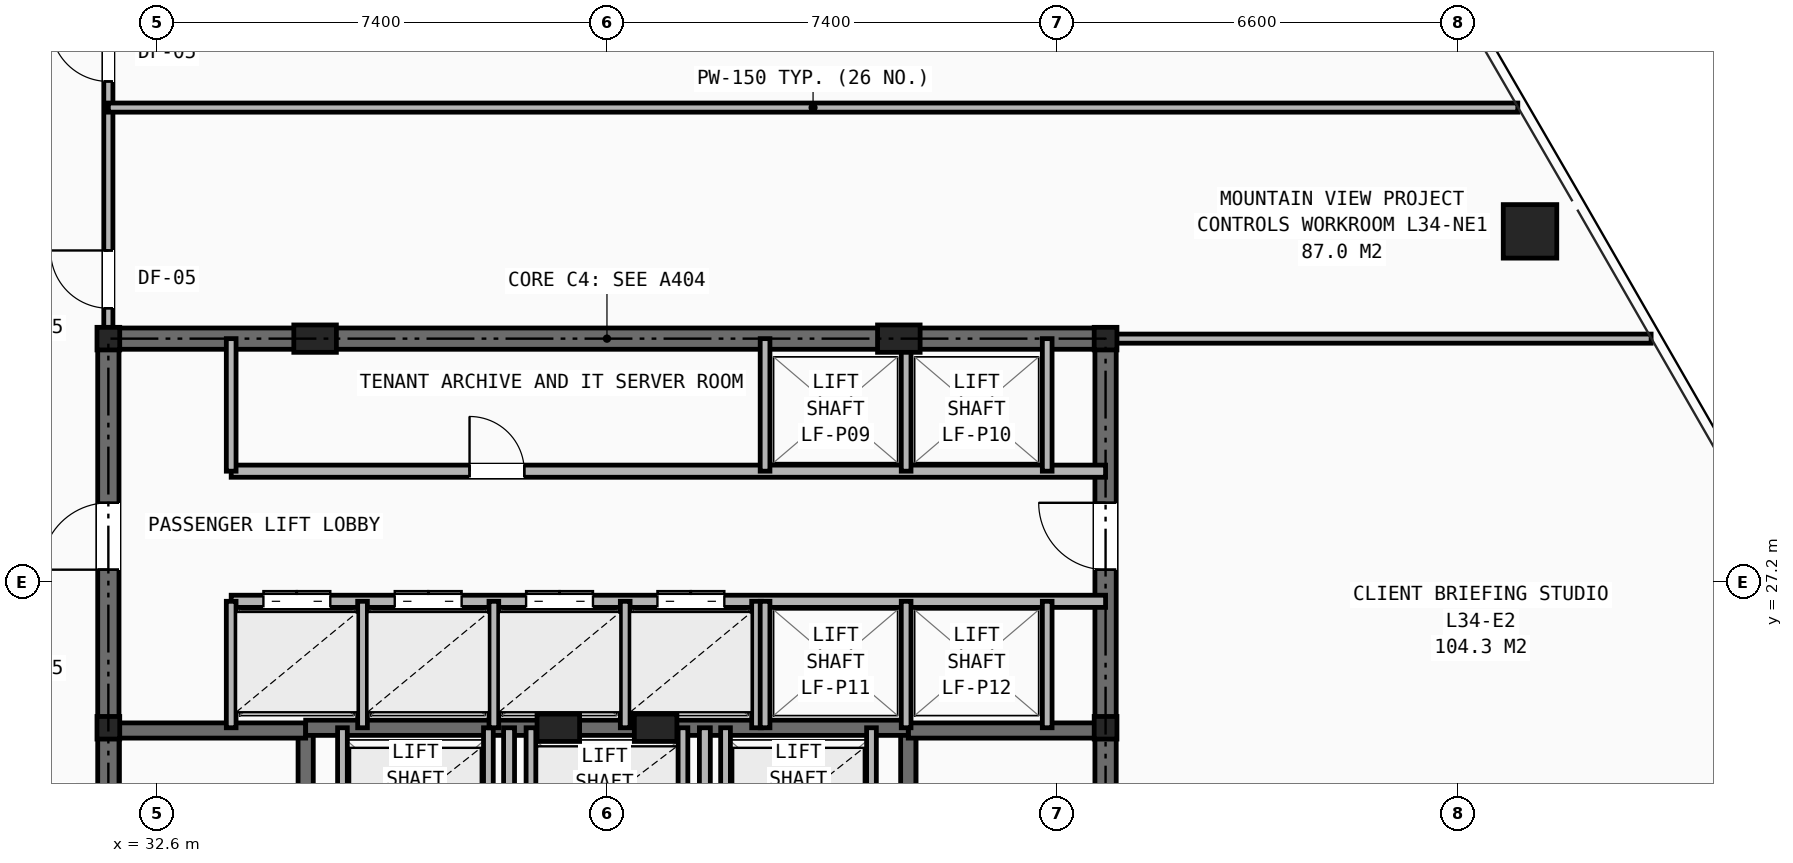
"""IFC4 building model, lengths in metres.
Left out: names, types, materials, properties, quantities, classifications, styles, units other than length and angle.
Written with IfcOpenShell. Run it as: python <this file> out.ifc"""

import sys

from ifc_helpers import new_model, si_unit, direction, frame, frame_2d, origin, origin_2d, place, context, subcontext, project, spatial, rectangle, hollow_rectangle, i_section, extrude, element, fill, save


model = new_model("IFC4")
c1 = context("Model", 3, precision=1e-05, world=origin(), true_north=direction((0.0, 1.0)))
c2 = subcontext(c1, "Body", "Model", "MODEL_VIEW")
j1 = project(units=[si_unit("LENGTHUNIT", "METRE"), si_unit("PLANEANGLEUNIT", "RADIAN")], contexts=[c1])
p1 = place(None, origin())
s1 = spatial("IfcSite", under=j1, at=p1, CompositionType="ELEMENT")
p2 = place(p1, origin())
s2 = spatial("IfcBuilding", under=s1, at=p2, CompositionType="ELEMENT")
p3 = place(p2, frame((0.0, 0.0, 119.45)))
s3 = spatial("IfcBuildingStorey", under=s2, at=p3, CompositionType="ELEMENT", Elevation=119.45)
for number, where, z_axis, x_axis in (
    (1, (31.8, 24.8, 0.0), (0.0, 0.0, 1.0), (1.0, 0.0, 0.0)),
    (2, (48.2, 24.8, 0.0), (0.0, 0.0, 1.0), (1.0, 0.0, 0.0)),
    (3, (31.8, 31.2, 0.0), (0.0, 0.0, 1.0), (1.0, 0.0, 0.0)),
    (4, (48.2, 31.2, 0.0), (0.0, 0.0, 1.0), (1.0, 0.0, 0.0)),
):
    element("IfcColumn", number, at=place(p3, frame(where, z_axis=z_axis, x_axis=x_axis)), inside=s3, PredefinedType="COLUMN", context=c2, shape_type="SweptSolid", body=[
        extrude(i_section(OverallWidth=0.374, OverallDepth=0.372, WebThickness=0.016, FlangeThickness=0.026, at=origin_2d()), origin(), (0.0, 0.0, 1.0), 3.45),
    ])
for number, where, z_axis, x_axis in (
    (5, (35.2, 31.2, 0.0), (0.0, 0.0, 1.0), (1.0, 0.0, 0.0)),
    (6, (44.8, 31.2, 0.0), (0.0, 0.0, 1.0), (1.0, 0.0, 0.0)),
    (7, (39.2, 24.8, 0.0), (0.0, 0.0, 1.0), (1.0, 0.0, 0.0)),
    (8, (40.8, 24.8, 0.0), (0.0, 0.0, 1.0), (1.0, 0.0, 0.0)),
):
    element("IfcColumn", number, at=place(p3, frame(where, z_axis=z_axis, x_axis=x_axis)), inside=s3, PredefinedType="PILASTER", context=c2, shape_type="SweptSolid", body=[
        extrude(rectangle(XDim=0.7, YDim=0.45, at=origin_2d()), origin(), (0.0, 0.0, 1.0), 3.45),
    ])
p4 = place(p3, frame((55.18, 32.964, 0.0), z_axis=(0.0, 0.0, 1.0), x_axis=(1.0, 0.0, 0.0)))
e9 = element("IfcColumn", 9, at=p4, inside=s3, PredefinedType="COLUMN", context=c2, shape_type="SweptSolid", body=[
    extrude(hollow_rectangle(XDim=0.88, YDim=0.88, WallThickness=0.06, at=origin_2d()), origin(), (0.0, 0.0, 1.0), 3.45),
])
p5 = place(p3, frame((31.8, 31.2, 0.0), z_axis=(0.0, 0.0, 1.0), x_axis=(1.0, 0.0, 0.0)))
e10 = element("IfcWall", 10, at=p5, inside=s3, PredefinedType="SHEAR", context=c2, shape_type="SweptSolid", body=[
    extrude(rectangle(XDim=16.4, YDim=0.35, at=frame_2d((8.2, 0.0))), origin(), (0.0, 0.0, 1.0), 3.21),
])
p6 = place(p3, frame((31.8, 16.4, 0.0), z_axis=(0.0, 0.0, 1.0), x_axis=(0.0, 1.0, 0.0)))
e11 = element("IfcWall", 11, at=p6, inside=s3, PredefinedType="SHEAR", context=c2, shape_type="SweptSolid", body=[
    extrude(rectangle(XDim=14.8, YDim=0.35, at=frame_2d((7.4, 0.0))), origin(), (0.0, 0.0, 1.0), 3.21),
])
p7 = place(p6, frame((11.0, 0.0, 0.0)))
e12 = element("IfcOpeningElement", 12, at=p7, cuts=e11, PredefinedType="OPENING", context=c2, shape_type="SweptSolid", body=[
    extrude(rectangle(XDim=1.1, YDim=2.15, at=frame_2d((0.55, 1.075))), frame((0.0, 0.185, 0.0), z_axis=(0.0, -1.0, 0.0), x_axis=(1.0, 0.0, 0.0)), (0.0, 0.0, 1.0), 0.37),
])
p8 = place(p3, frame((48.2, 16.4, 0.0), z_axis=(0.0, 0.0, 1.0), x_axis=(0.0, 1.0, 0.0)))
e13 = element("IfcWall", 13, at=p8, inside=s3, PredefinedType="SHEAR", context=c2, shape_type="SweptSolid", body=[
    extrude(rectangle(XDim=14.8, YDim=0.35, at=frame_2d((7.4, 0.0))), origin(), (0.0, 0.0, 1.0), 3.21),
])
p9 = place(p8, frame((11.0, 0.0, 0.0)))
e14 = element("IfcOpeningElement", 14, at=p9, cuts=e13, PredefinedType="OPENING", context=c2, shape_type="SweptSolid", body=[
    extrude(rectangle(XDim=1.1, YDim=2.15, at=frame_2d((0.55, 1.075))), frame((0.0, 0.185, 0.0), z_axis=(0.0, -1.0, 0.0), x_axis=(1.0, 0.0, 0.0)), (0.0, 0.0, 1.0), 0.37),
])
p10 = place(p3, frame((35.045, 16.4, 0.0), z_axis=(0.0, 0.0, 1.0), x_axis=(0.0, 1.0, 0.0)))
e15 = element("IfcWall", 15, at=p10, inside=s3, PredefinedType="SHEAR", context=c2, shape_type="SweptSolid", body=[
    extrude(rectangle(XDim=8.4, YDim=0.25, at=frame_2d((4.2, 0.0))), origin(), (0.0, 0.0, 1.0), 3.21),
])
p11 = place(p10, frame((0.45, 0.0, 0.0)))
e16 = element("IfcOpeningElement", 16, at=p11, cuts=e15, PredefinedType="OPENING", context=c2, shape_type="SweptSolid", body=[
    extrude(rectangle(XDim=0.95, YDim=2.1, at=frame_2d((0.475, 1.05))), frame((0.0, 0.135, 0.0), z_axis=(0.0, -1.0, 0.0), x_axis=(1.0, 0.0, 0.0)), (0.0, 0.0, 1.0), 0.27),
])
p12 = place(p3, frame((31.8, 24.755, 0.0), z_axis=(0.0, 0.0, 1.0), x_axis=(1.0, 0.0, 0.0)))
e17 = element("IfcWall", 17, at=p12, inside=s3, PredefinedType="SHEAR", context=c2, shape_type="SweptSolid", body=[
    extrude(rectangle(XDim=3.245, YDim=0.25, at=frame_2d((1.623, 0.0))), origin(), (0.0, 0.0, 1.0), 3.21),
])
p13 = place(p3, frame((44.955, 16.4, 0.0), z_axis=(0.0, 0.0, 1.0), x_axis=(0.0, 1.0, 0.0)))
e18 = element("IfcWall", 18, at=p13, inside=s3, PredefinedType="SHEAR", context=c2, shape_type="SweptSolid", body=[
    extrude(rectangle(XDim=8.4, YDim=0.25, at=frame_2d((4.2, 0.0))), origin(), (0.0, 0.0, 1.0), 3.21),
])
p14 = place(p13, frame((0.45, 0.0, 0.0)))
e19 = element("IfcOpeningElement", 19, at=p14, cuts=e18, PredefinedType="OPENING", context=c2, shape_type="SweptSolid", body=[
    extrude(rectangle(XDim=0.95, YDim=2.1, at=frame_2d((0.475, 1.05))), frame((0.0, 0.135, 0.0), z_axis=(0.0, -1.0, 0.0), x_axis=(1.0, 0.0, 0.0)), (0.0, 0.0, 1.0), 0.27),
])
p15 = place(p3, frame((44.955, 24.755, 0.0), z_axis=(0.0, 0.0, 1.0), x_axis=(1.0, 0.0, 0.0)))
e20 = element("IfcWall", 20, at=p15, inside=s3, PredefinedType="SHEAR", context=c2, shape_type="SweptSolid", body=[
    extrude(rectangle(XDim=3.245, YDim=0.25, at=frame_2d((1.623, 0.0))), origin(), (0.0, 0.0, 1.0), 3.21),
])
p16 = place(p3, frame((35.045, 24.8, 0.0), z_axis=(0.0, 0.0, 1.0), x_axis=(1.0, 0.0, 0.0)))
e21 = element("IfcWall", 21, at=p16, inside=s3, PredefinedType="SHEAR", context=c2, shape_type="SweptSolid", body=[
    extrude(rectangle(XDim=9.91, YDim=0.25, at=frame_2d((4.955, 0.0))), origin(), (0.0, 0.0, 1.0), 3.21),
])
p17 = place(p3, frame((38.39, 16.4, 0.0), z_axis=(0.0, 0.0, 1.0), x_axis=(0.0, 1.0, 0.0)))
e22 = element("IfcWall", 22, at=p17, inside=s3, PredefinedType="PARTITIONING", context=c2, shape_type="SweptSolid", body=[
    extrude(rectangle(XDim=8.4, YDim=0.18, at=frame_2d((4.2, 0.0))), origin(), (0.0, 0.0, 1.0), 2.661),
])
p18 = place(p17, frame((1.8, 0.0, 0.0)))
e23 = element("IfcOpeningElement", 23, at=p18, cuts=e22, PredefinedType="OPENING", context=c2, shape_type="SweptSolid", body=[
    extrude(rectangle(XDim=0.85, YDim=2.05, at=frame_2d((0.425, 1.025))), frame((0.0, 0.1, 0.0), z_axis=(0.0, -1.0, 0.0), x_axis=(1.0, 0.0, 0.0)), (0.0, 0.0, 1.0), 0.2),
])
p19 = place(p17, frame((4.35, 0.0, 0.0)))
e24 = element("IfcOpeningElement", 24, at=p19, cuts=e22, PredefinedType="OPENING", context=c2, shape_type="SweptSolid", body=[
    extrude(rectangle(XDim=0.95, YDim=2.1, at=frame_2d((0.475, 1.05))), frame((0.0, 0.1, 0.0), z_axis=(0.0, -1.0, 0.0), x_axis=(1.0, 0.0, 0.0)), (0.0, 0.0, 1.0), 0.2),
])
p20 = place(p3, frame((41.61, 16.4, 0.0), z_axis=(0.0, 0.0, 1.0), x_axis=(0.0, 1.0, 0.0)))
e25 = element("IfcWall", 25, at=p20, inside=s3, PredefinedType="PARTITIONING", context=c2, shape_type="SweptSolid", body=[
    extrude(rectangle(XDim=8.4, YDim=0.18, at=frame_2d((4.2, 0.0))), origin(), (0.0, 0.0, 1.0), 2.661),
])
p21 = place(p20, frame((1.8, 0.0, 0.0)))
e26 = element("IfcOpeningElement", 26, at=p21, cuts=e25, PredefinedType="OPENING", context=c2, shape_type="SweptSolid", body=[
    extrude(rectangle(XDim=0.85, YDim=2.05, at=frame_2d((0.425, 1.025))), frame((0.0, 0.1, 0.0), z_axis=(0.0, -1.0, 0.0), x_axis=(1.0, 0.0, 0.0)), (0.0, 0.0, 1.0), 0.2),
])
for number, where, z_axis, x_axis in (
    (27, (35.65, 22.48, 0.0), (0.0, 0.0, 1.0), (0.0, 1.0, 0.0)),
    (28, (38.05, 22.48, 0.0), (0.0, 0.0, 1.0), (0.0, 1.0, 0.0)),
    (29, (41.95, 22.48, 0.0), (0.0, 0.0, 1.0), (0.0, 1.0, 0.0)),
    (30, (44.35, 22.48, 0.0), (0.0, 0.0, 1.0), (0.0, 1.0, 0.0)),
    (31, (38.75, 22.48, 0.0), (0.0, 0.0, 1.0), (0.0, 1.0, 0.0)),
    (32, (41.25, 22.48, 0.0), (0.0, 0.0, 1.0), (0.0, 1.0, 0.0)),
):
    element("IfcWall", number, at=place(p3, frame(where, z_axis=z_axis, x_axis=x_axis)), inside=s3, PredefinedType="SOLIDWALL", context=c2, shape_type="SweptSolid", body=[
        extrude(rectangle(XDim=2.32, YDim=0.16, at=frame_2d((1.16, 0.0))), origin(), (0.0, 0.0, 1.0), 3.21),
    ])
p22 = place(p3, frame((33.82, 29.02, 0.0), z_axis=(0.0, 0.0, 1.0), x_axis=(1.0, 0.0, 0.0)))
e33 = element("IfcWall", 33, at=p22, inside=s3, PredefinedType="SOLIDWALL", context=c2, shape_type="SweptSolid", body=[
    extrude(rectangle(XDim=14.38, YDim=0.2, at=frame_2d((7.19, 0.0))), origin(), (0.0, 0.0, 1.0), 2.661),
])
p23 = place(p22, frame((3.92, 0.0, 0.0)))
e34 = element("IfcOpeningElement", 34, at=p23, cuts=e33, PredefinedType="OPENING", context=c2, shape_type="SweptSolid", body=[
    extrude(rectangle(XDim=0.9, YDim=2.1, at=frame_2d((0.45, 1.05))), frame((0.0, 0.11, 0.0), z_axis=(0.0, -1.0, 0.0), x_axis=(1.0, 0.0, 0.0)), (0.0, 0.0, 1.0), 0.22),
])
p24 = place(p3, frame((33.82, 26.88, 0.0), z_axis=(0.0, 0.0, 1.0), x_axis=(1.0, 0.0, 0.0)))
e35 = element("IfcWall", 35, at=p24, inside=s3, PredefinedType="SOLIDWALL", context=c2, shape_type="SweptSolid", body=[
    extrude(rectangle(XDim=14.38, YDim=0.2, at=frame_2d((7.19, 0.0))), origin(), (0.0, 0.0, 1.0), 2.661),
])
p25 = place(p24, frame((0.53, 0.0, 0.0)))
e36 = element("IfcOpeningElement", 36, at=p25, cuts=e35, PredefinedType="OPENING", context=c2, shape_type="SweptSolid", body=[
    extrude(rectangle(XDim=1.1, YDim=2.15, at=frame_2d((0.55, 1.075))), frame((0.0, 0.11, 0.0), z_axis=(0.0, -1.0, 0.0), x_axis=(1.0, 0.0, 0.0)), (0.0, 0.0, 1.0), 0.22),
])
p26 = place(p24, frame((2.69, 0.0, 0.0)))
e37 = element("IfcOpeningElement", 37, at=p26, cuts=e35, PredefinedType="OPENING", context=c2, shape_type="SweptSolid", body=[
    extrude(rectangle(XDim=1.1, YDim=2.15, at=frame_2d((0.55, 1.075))), frame((0.0, 0.11, 0.0), z_axis=(0.0, -1.0, 0.0), x_axis=(1.0, 0.0, 0.0)), (0.0, 0.0, 1.0), 0.22),
])
p27 = place(p24, frame((4.85, 0.0, 0.0)))
e38 = element("IfcOpeningElement", 38, at=p27, cuts=e35, PredefinedType="OPENING", context=c2, shape_type="SweptSolid", body=[
    extrude(rectangle(XDim=1.1, YDim=2.15, at=frame_2d((0.55, 1.075))), frame((0.0, 0.11, 0.0), z_axis=(0.0, -1.0, 0.0), x_axis=(1.0, 0.0, 0.0)), (0.0, 0.0, 1.0), 0.22),
])
p28 = place(p24, frame((7.01, 0.0, 0.0)))
e39 = element("IfcOpeningElement", 39, at=p28, cuts=e35, PredefinedType="OPENING", context=c2, shape_type="SweptSolid", body=[
    extrude(rectangle(XDim=1.1, YDim=2.15, at=frame_2d((0.55, 1.075))), frame((0.0, 0.11, 0.0), z_axis=(0.0, -1.0, 0.0), x_axis=(1.0, 0.0, 0.0)), (0.0, 0.0, 1.0), 0.22),
])
p29 = place(p3, frame((33.82, 29.02, 0.0), z_axis=(0.0, 0.0, 1.0), x_axis=(0.0, 1.0, 0.0)))
e40 = element("IfcWall", 40, at=p29, inside=s3, PredefinedType="SOLIDWALL", context=c2, shape_type="SweptSolid", body=[
    extrude(rectangle(XDim=2.18, YDim=0.16, at=frame_2d((1.09, 0.0))), origin(), (0.0, 0.0, 1.0), 2.661),
])
for number, where, z_axis, x_axis in (
    (41, (33.82, 24.8, 0.0), (0.0, 0.0, 1.0), (0.0, 1.0, 0.0)),
    (42, (35.98, 24.8, 0.0), (0.0, 0.0, 1.0), (0.0, 1.0, 0.0)),
    (43, (38.14, 24.8, 0.0), (0.0, 0.0, 1.0), (0.0, 1.0, 0.0)),
    (44, (40.3, 24.8, 0.0), (0.0, 0.0, 1.0), (0.0, 1.0, 0.0)),
    (45, (42.46, 24.8, 0.0), (0.0, 0.0, 1.0), (0.0, 1.0, 0.0)),
):
    element("IfcWall", number, at=place(p3, frame(where, z_axis=z_axis, x_axis=x_axis)), inside=s3, PredefinedType="SOLIDWALL", context=c2, shape_type="SweptSolid", body=[
        extrude(rectangle(XDim=2.08, YDim=0.16, at=frame_2d((1.04, 0.0))), origin(), (0.0, 0.0, 1.0), 3.21),
    ])
for number, where, z_axis, x_axis in (
    (46, (42.6, 29.02, 0.0), (0.0, 0.0, 1.0), (0.0, 1.0, 0.0)),
    (47, (44.92, 29.02, 0.0), (0.0, 0.0, 1.0), (0.0, 1.0, 0.0)),
    (48, (47.24, 29.02, 0.0), (0.0, 0.0, 1.0), (0.0, 1.0, 0.0)),
):
    element("IfcWall", number, at=place(p3, frame(where, z_axis=z_axis, x_axis=x_axis)), inside=s3, PredefinedType="SOLIDWALL", context=c2, shape_type="SweptSolid", body=[
        extrude(rectangle(XDim=2.18, YDim=0.16, at=frame_2d((1.09, 0.0))), origin(), (0.0, 0.0, 1.0), 2.661),
    ])
for number, where, z_axis, x_axis in (
    (49, (42.6, 24.8, 0.0), (0.0, 0.0, 1.0), (0.0, 1.0, 0.0)),
    (50, (44.92, 24.8, 0.0), (0.0, 0.0, 1.0), (0.0, 1.0, 0.0)),
    (51, (47.24, 24.8, 0.0), (0.0, 0.0, 1.0), (0.0, 1.0, 0.0)),
):
    element("IfcWall", number, at=place(p3, frame(where, z_axis=z_axis, x_axis=x_axis)), inside=s3, PredefinedType="SOLIDWALL", context=c2, shape_type="SweptSolid", body=[
        extrude(rectangle(XDim=2.08, YDim=0.16, at=frame_2d((1.04, 0.0))), origin(), (0.0, 0.0, 1.0), 3.21),
    ])
p30 = place(p3, frame((31.8, 31.2, 0.0), z_axis=(0.0, 0.0, 1.0), x_axis=(0.0, 1.0, 0.0)))
e52 = element("IfcWall", 52, at=p30, inside=s3, PredefinedType="PARTITIONING", context=c2, shape_type="SweptSolid", body=[
    extrude(rectangle(XDim=5.3, YDim=0.15, at=frame_2d((2.65, 0.0))), origin(), (0.0, 0.0, 1.0), 2.252),
])
p31 = place(p30, frame((0.5, 0.0, 0.0)))
e53 = element("IfcOpeningElement", 53, at=p31, cuts=e52, PredefinedType="OPENING", context=c2, shape_type="SweptSolid", body=[
    extrude(rectangle(XDim=0.95, YDim=2.1, at=frame_2d((0.475, 1.05))), frame((0.0, 0.085, 0.0), z_axis=(0.0, -1.0, 0.0), x_axis=(1.0, 0.0, 0.0)), (0.0, 0.0, 1.0), 0.17),
])
p32 = place(p30, frame((4.23, 0.0, 0.0)))
e54 = element("IfcOpeningElement", 54, at=p32, cuts=e52, PredefinedType="OPENING", context=c2, shape_type="SweptSolid", body=[
    extrude(rectangle(XDim=0.95, YDim=2.1, at=frame_2d((0.475, 1.05))), frame((0.0, 0.085, 0.0), z_axis=(0.0, -1.0, 0.0), x_axis=(1.0, 0.0, 0.0)), (0.0, 0.0, 1.0), 0.17),
])
p33 = place(p3, frame((48.2, 31.2, 0.0), z_axis=(0.0, 0.0, 1.0), x_axis=(1.0, 0.0, 0.0)))
e55 = element("IfcWall", 55, at=p33, inside=s3, PredefinedType="PARTITIONING", context=c2, shape_type="SweptSolid", body=[
    extrude(rectangle(XDim=8.972, YDim=0.15, at=frame_2d((4.486, 0.0))), origin(), (0.0, 0.0, 1.0), 2.252),
])
p34 = place(p3, frame((31.8, 35.0, 0.0), z_axis=(0.0, 0.0, 1.0), x_axis=(1.0, 0.0, 0.0)))
e56 = element("IfcWall", 56, at=p34, inside=s3, PredefinedType="PARTITIONING", context=c2, shape_type="SweptSolid", body=[
    extrude(rectangle(XDim=23.179, YDim=0.15, at=frame_2d((11.59, 0.0))), origin(), (0.0, 0.0, 1.0), 2.589),
])
p35 = place(p7, origin())
e57 = element("IfcDoor", 57, at=p35, inside=s3, OperationType="SINGLE_SWING_LEFT", PredefinedType="DOOR", context=c2, shape_type="SweptSolid", body=[
    extrude(rectangle(XDim=1.1, YDim=2.15, at=frame_2d((0.55, 1.075))), frame((0.0, 0.025, 0.0), z_axis=(0.0, -1.0, 0.0), x_axis=(1.0, 0.0, 0.0)), (0.0, 0.0, 1.0), 0.05),
])
fill(e12, e57)
p36 = place(p9, origin())
e58 = element("IfcDoor", 58, at=p36, inside=s3, OperationType="SINGLE_SWING_RIGHT", PredefinedType="DOOR", context=c2, shape_type="SweptSolid", body=[
    extrude(rectangle(XDim=1.1, YDim=2.15, at=frame_2d((0.55, 1.075))), frame((0.0, 0.025, 0.0), z_axis=(0.0, -1.0, 0.0), x_axis=(1.0, 0.0, 0.0)), (0.0, 0.0, 1.0), 0.05),
])
fill(e14, e58)
p37 = place(p23, origin())
e59 = element("IfcDoor", 59, at=p37, inside=s3, OperationType="SINGLE_SWING_LEFT", PredefinedType="DOOR", context=c2, shape_type="SweptSolid", body=[
    extrude(rectangle(XDim=0.9, YDim=2.1, at=frame_2d((0.45, 1.05))), frame((0.0, 0.025, 0.0), z_axis=(0.0, -1.0, 0.0), x_axis=(1.0, 0.0, 0.0)), (0.0, 0.0, 1.0), 0.05),
])
fill(e34, e59)
p38 = place(p25, origin())
e60 = element("IfcDoor", 60, at=p38, inside=s3, OperationType="DOUBLE_DOOR_SLIDING", PredefinedType="DOOR", context=c2, shape_type="SweptSolid", body=[
    extrude(rectangle(XDim=1.1, YDim=2.15, at=frame_2d((0.55, 1.075))), frame((0.0, 0.025, 0.0), z_axis=(0.0, -1.0, 0.0), x_axis=(1.0, 0.0, 0.0)), (0.0, 0.0, 1.0), 0.05),
])
fill(e36, e60)
p39 = place(p26, origin())
e61 = element("IfcDoor", 61, at=p39, inside=s3, OperationType="DOUBLE_DOOR_SLIDING", PredefinedType="DOOR", context=c2, shape_type="SweptSolid", body=[
    extrude(rectangle(XDim=1.1, YDim=2.15, at=frame_2d((0.55, 1.075))), frame((0.0, 0.025, 0.0), z_axis=(0.0, -1.0, 0.0), x_axis=(1.0, 0.0, 0.0)), (0.0, 0.0, 1.0), 0.05),
])
fill(e37, e61)
p40 = place(p27, origin())
e62 = element("IfcDoor", 62, at=p40, inside=s3, OperationType="DOUBLE_DOOR_SLIDING", PredefinedType="DOOR", context=c2, shape_type="SweptSolid", body=[
    extrude(rectangle(XDim=1.1, YDim=2.15, at=frame_2d((0.55, 1.075))), frame((0.0, 0.025, 0.0), z_axis=(0.0, -1.0, 0.0), x_axis=(1.0, 0.0, 0.0)), (0.0, 0.0, 1.0), 0.05),
])
fill(e38, e62)
p41 = place(p28, origin())
e63 = element("IfcDoor", 63, at=p41, inside=s3, OperationType="DOUBLE_DOOR_SLIDING", PredefinedType="DOOR", context=c2, shape_type="SweptSolid", body=[
    extrude(rectangle(XDim=1.1, YDim=2.15, at=frame_2d((0.55, 1.075))), frame((0.0, 0.025, 0.0), z_axis=(0.0, -1.0, 0.0), x_axis=(1.0, 0.0, 0.0)), (0.0, 0.0, 1.0), 0.05),
])
fill(e39, e63)
p42 = place(p31, origin())
e64 = element("IfcDoor", 64, at=p42, inside=s3, OperationType="SINGLE_SWING_RIGHT", PredefinedType="DOOR", context=c2, shape_type="SweptSolid", body=[
    extrude(rectangle(XDim=0.95, YDim=2.1, at=frame_2d((0.475, 1.05))), frame((0.0, 0.025, 0.0), z_axis=(0.0, -1.0, 0.0), x_axis=(1.0, 0.0, 0.0)), (0.0, 0.0, 1.0), 0.05),
])
fill(e53, e64)
p43 = place(p32, origin())
e65 = element("IfcDoor", 65, at=p43, inside=s3, OperationType="SINGLE_SWING_RIGHT", PredefinedType="DOOR", context=c2, shape_type="SweptSolid", body=[
    extrude(rectangle(XDim=0.95, YDim=2.1, at=frame_2d((0.475, 1.05))), frame((0.0, 0.025, 0.0), z_axis=(0.0, -1.0, 0.0), x_axis=(1.0, 0.0, 0.0)), (0.0, 0.0, 1.0), 0.05),
])
fill(e54, e65)
save(model, sys.argv[1])
